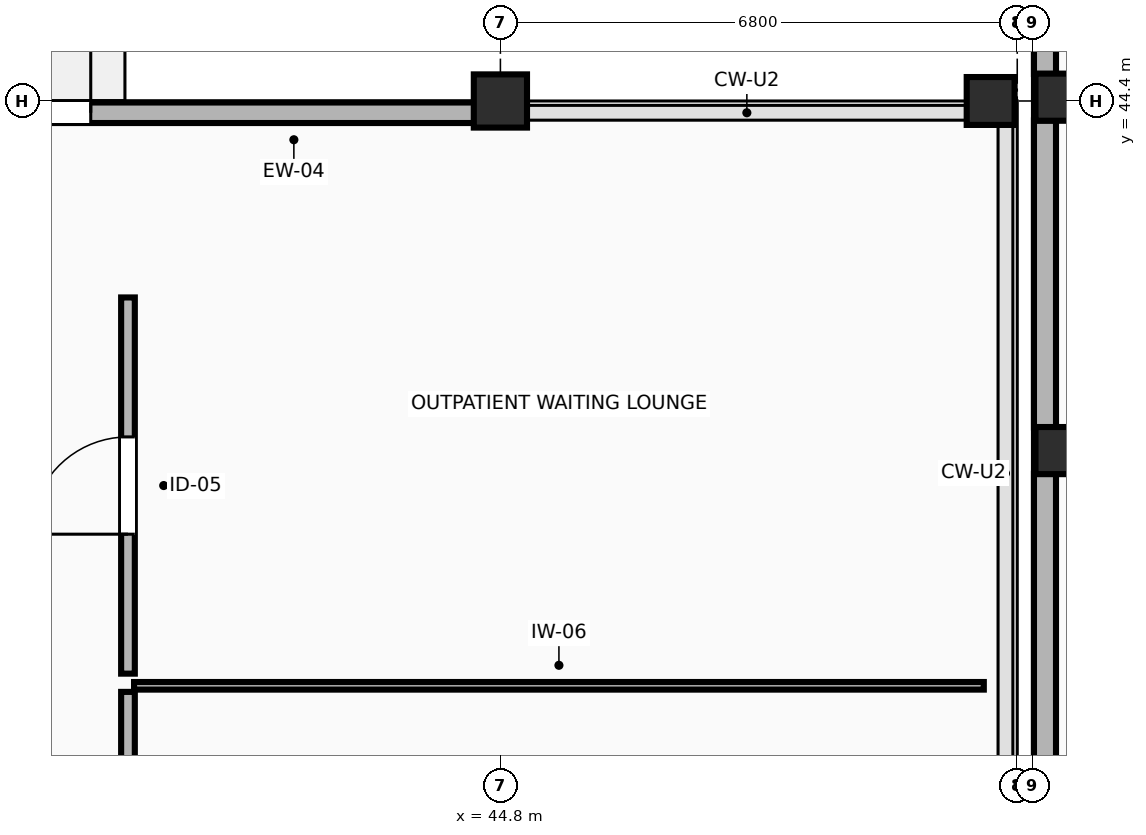
"""IFC4 building model, lengths in metres.
Left out: names, types, materials, properties, quantities, classifications, styles, units other than length and angle.
Written with IfcOpenShell. Run it as: python <this file> out.ifc"""

import sys

from ifc_helpers import new_model, si_unit, direction, frame, frame_2d, origin, origin_2d, place, context, subcontext, project, spatial, rectangle, circle, extrude, element, fill, save


model = new_model("IFC4")
c1 = context("Model", 3, precision=1e-05, world=origin(), true_north=direction((0.0, 1.0)))
c2 = subcontext(c1, "Body", "Model", "MODEL_VIEW")
j1 = project(units=[si_unit("LENGTHUNIT", "METRE"), si_unit("PLANEANGLEUNIT", "RADIAN")], contexts=[c1])
p1 = place(None, origin())
s1 = spatial("IfcSite", under=j1, at=p1, CompositionType="ELEMENT")
p2 = place(p1, origin())
s2 = spatial("IfcBuilding", under=s1, at=p2, CompositionType="ELEMENT")
p3 = place(p2, origin())
s3 = spatial("IfcBuildingStorey", under=s2, at=p3, CompositionType="ELEMENT", Elevation=0.0)
for number, where, z_axis, x_axis in (
    (1, (52.15, 39.8, 0.0), (0.0, 0.0, 1.0), (1.0, 0.0, 0.0)),
    (2, (52.15, 44.45, 0.0), (0.0, 0.0, 1.0), (1.0, 0.0, 0.0)),
):
    element("IfcColumn", number, at=place(p3, frame(where, z_axis=z_axis, x_axis=x_axis)), inside=s3, PredefinedType="COLUMN", context=c2, shape_type="SweptSolid", body=[
        extrude(circle(Radius=0.31, at=origin_2d()), origin(), (0.0, 0.0, 1.0), 5.4),
    ])
p4 = place(p3, frame((44.8, 44.4, 0.0), z_axis=(0.0, 0.0, 1.0), x_axis=(1.0, 0.0, 0.0)))
e3 = element("IfcColumn", 3, at=p4, inside=s3, PredefinedType="COLUMN", context=c2, shape_type="SweptSolid", body=[
    extrude(rectangle(XDim=0.7, YDim=0.7, at=origin_2d()), origin(), (0.0, 0.0, 1.0), 5.4),
])
p5 = place(p3, frame((51.25, 44.4, 0.0), z_axis=(0.0, 0.0, 1.0), x_axis=(1.0, 0.0, 0.0)))
e4 = element("IfcColumn", 4, at=p5, inside=s3, PredefinedType="COLUMN", context=c2, shape_type="SweptSolid", body=[
    extrude(rectangle(XDim=0.63, YDim=0.63, at=origin_2d()), origin(), (0.0, 0.0, 1.0), 5.4),
])
for number, where, z_axis, x_axis in (
    (5, (51.965, 48.795, 0.0), (0.0, 0.0, 1.0), (0.0, -1.0, 0.0)),
    (6, (51.965, 44.145, 0.0), (0.0, 0.0, 1.0), (0.0, -1.0, 0.0)),
    (7, (51.965, 39.495, 0.0), (0.0, 0.0, 1.0), (0.0, -1.0, 0.0)),
):
    element("IfcWall", number, at=place(p3, frame(where, z_axis=z_axis, x_axis=x_axis)), inside=s3, PredefinedType="STANDARD", context=c2, shape_type="SweptSolid", body=[
        extrude(rectangle(XDim=4.04, YDim=0.29, at=frame_2d((2.02, 0.0))), origin(), (0.0, 0.0, 1.0), 4.625),
    ])
p6 = place(p3, frame((44.455, 44.245, 0.0), z_axis=(0.0, 0.0, 1.0), x_axis=(-1.0, 0.0, 0.0)))
e8 = element("IfcWall", 8, at=p6, inside=s3, PredefinedType="STANDARD", context=c2, shape_type="SweptSolid", body=[
    extrude(rectangle(XDim=7.835, YDim=0.27, at=frame_2d((3.917, 0.0))), origin(), (0.0, 0.0, 1.0), 4.385),
])
p7 = place(p6, frame((5.045, 0.0, 0.0)))
e9 = element("IfcOpeningElement", 9, at=p7, cuts=e8, PredefinedType="OPENING", context=c2, shape_type="SweptSolid", body=[
    extrude(rectangle(XDim=2.0, YDim=2.4, at=frame_2d((1.0, 1.2))), frame((0.0, 0.145, 0.0), z_axis=(0.0, -1.0, 0.0), x_axis=(1.0, 0.0, 0.0)), (0.0, 0.0, 1.0), 0.29),
])
p8 = place(p3, frame((39.9, 29.53, 0.0), z_axis=(0.0, 0.0, 1.0), x_axis=(0.0, 1.0, 0.0)))
e10 = element("IfcWall", 10, at=p8, inside=s3, PredefinedType="PARTITIONING", context=c2, shape_type="SweptSolid", body=[
    extrude(rectangle(XDim=7.095, YDim=0.18, at=frame_2d((3.547, 0.0))), origin(), (0.0, 0.0, 1.0), 5.05),
])
p9 = place(p3, frame((39.98, 36.705, 0.0), z_axis=(0.0, 0.0, 1.0), x_axis=(1.0, 0.0, 0.0)))
e11 = element("IfcWall", 11, at=p9, inside=s3, PredefinedType="PARTITIONING", context=c2, shape_type="SweptSolid", body=[
    extrude(rectangle(XDim=11.18, YDim=0.1, at=frame_2d((5.59, 0.0))), origin(), (0.0, 0.0, 1.0), 5.05),
])
p10 = place(p3, frame((39.9, 36.865, 0.0), z_axis=(0.0, 0.0, 1.0), x_axis=(0.0, 1.0, 0.0)))
e12 = element("IfcWall", 12, at=p10, inside=s3, PredefinedType="PARTITIONING", context=c2, shape_type="SweptSolid", body=[
    extrude(rectangle(XDim=4.95, YDim=0.18, at=frame_2d((2.475, 0.0))), origin(), (0.0, 0.0, 1.0), 5.05),
])
p11 = place(p10, frame((1.835, 0.0, 0.0)))
e13 = element("IfcOpeningElement", 13, at=p11, cuts=e12, PredefinedType="OPENING", context=c2, shape_type="SweptSolid", body=[
    extrude(rectangle(XDim=1.28, YDim=2.25, at=frame_2d((0.64, 1.125))), frame((0.0, 0.1, 0.0), z_axis=(0.0, -1.0, 0.0), x_axis=(1.0, 0.0, 0.0)), (0.0, 0.0, 1.0), 0.2),
])
p12 = place(p7, frame((2.0, 0.0, 0.0), z_axis=(0.0, 0.0, 1.0), x_axis=(-1.0, 0.0, 0.0)))
e14 = element("IfcDoor", 14, at=p12, inside=s3, OperationType="DOUBLE_DOOR_SINGLE_SWING", PredefinedType="DOOR", context=c2, shape_type="SweptSolid", body=[
    extrude(rectangle(XDim=2.0, YDim=2.4, at=frame_2d((1.0, 1.2))), frame((0.0, 0.025, 0.0), z_axis=(0.0, -1.0, 0.0), x_axis=(1.0, 0.0, 0.0)), (0.0, 0.0, 1.0), 0.05),
])
fill(e9, e14)
p13 = place(p11, origin())
e15 = element("IfcDoor", 15, at=p13, inside=s3, OperationType="SINGLE_SWING_LEFT", PredefinedType="DOOR", context=c2, shape_type="SweptSolid", body=[
    extrude(rectangle(XDim=1.28, YDim=2.25, at=frame_2d((0.64, 1.125))), frame((0.0, 0.025, 0.0), z_axis=(0.0, -1.0, 0.0), x_axis=(1.0, 0.0, 0.0)), (0.0, 0.0, 1.0), 0.05),
])
fill(e13, e15)
save(model, sys.argv[1])
